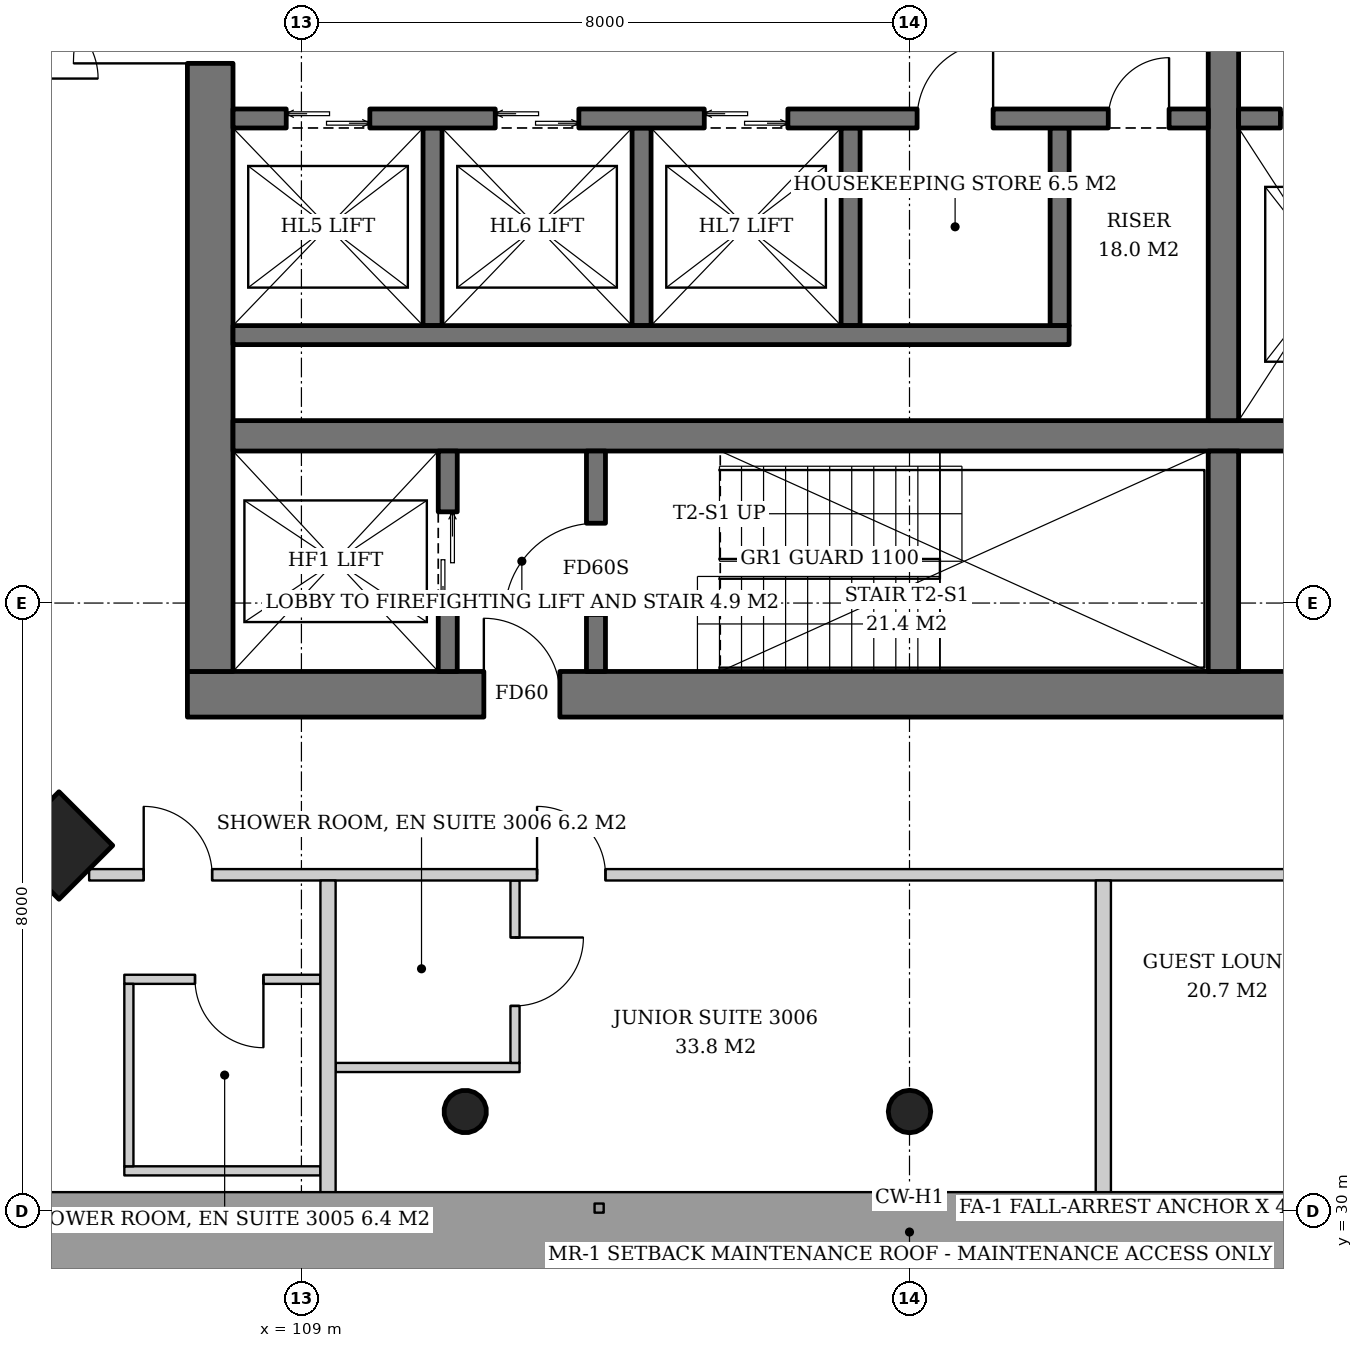
"""IFC4 building model, lengths in metres.
Left out: names, types, materials, properties, quantities, classifications, styles, units other than length and angle.
Written with IfcOpenShell. Run it as: python <this file> out.ifc"""

import sys

from ifc_helpers import new_model, si_unit, direction, frame, frame_2d, origin, origin_2d, place, context, subcontext, project, spatial, rectangle, hollow_circle, extrude, element, fill, save


model = new_model("IFC4")
c1 = context("Model", 3, precision=1e-05, world=origin(), true_north=direction((0.0, 1.0)))
c2 = subcontext(c1, "Body", "Model", "MODEL_VIEW")
j1 = project(units=[si_unit("LENGTHUNIT", "METRE"), si_unit("PLANEANGLEUNIT", "RADIAN")], contexts=[c1])
p1 = place(None, origin())
s1 = spatial("IfcSite", under=j1, at=p1, CompositionType="ELEMENT")
p2 = place(p1, origin())
s2 = spatial("IfcBuilding", under=s1, at=p2, CompositionType="ELEMENT")
p3 = place(p2, frame((0.0, 0.0, 119.8)))
s3 = spatial("IfcBuildingStorey", under=s2, at=p3, CompositionType="ELEMENT", Elevation=119.8)
p4 = place(p3, frame((105.759, 34.759, 0.0), z_axis=(0.043029647111, 0.043029647111, 0.998146732169), x_axis=(-0.707106781187, 0.707106781187, 0.0)))
e1 = element("IfcColumn", 1, at=p4, inside=s3, PredefinedType="COLUMN", context=c2, shape_type="SweptSolid", body=[
    extrude(rectangle(XDim=1.0, YDim=1.0, at=origin_2d()), origin(), (0.0, 0.0, 1.0), 3.807),
])
p5 = place(p3, frame((111.129, 31.259, 0.0), z_axis=(0.021497706284, 0.043059584825, 0.998841188968), x_axis=(-0.894693706707, 0.446680166538, 0.0)))
e2 = element("IfcColumn", 2, at=p5, inside=s3, PredefinedType="COLUMN", context=c2, shape_type="SweptSolid", body=[
    extrude(hollow_circle(Radius=0.28, WallThickness=0.02, at=origin_2d()), origin(), (0.0, 0.0, 1.0), 3.804),
])
p6 = place(p3, frame((117.0, 31.259, 0.0), z_axis=(0.0, 0.043069538298, 0.999072076915), x_axis=(-1.0, 0.0, 0.0)))
e3 = element("IfcColumn", 3, at=p6, inside=s3, PredefinedType="COLUMN", context=c2, shape_type="SweptSolid", body=[
    extrude(hollow_circle(Radius=0.28, WallThickness=0.02, at=origin_2d()), origin(), (0.0, 0.0, 1.0), 3.803),
])
p7 = place(p3, frame((107.5, 36.8, 0.0), z_axis=(0.0, 0.0, 1.0), x_axis=(1.0, 0.0, 0.0)))
e4 = element("IfcWall", 4, at=p7, inside=s3, PredefinedType="SHEAR", context=c2, shape_type="SweptSolid", body=[
    extrude(rectangle(XDim=19.0, YDim=0.6, at=frame_2d((9.5, 0.0))), origin(), (0.0, 0.0, 1.0), 3.8),
])
p8 = place(p7, frame((3.9, 0.0, 0.0)))
e5 = element("IfcOpeningElement", 5, at=p8, cuts=e4, PredefinedType="OPENING", context=c2, shape_type="SweptSolid", body=[
    extrude(rectangle(XDim=1.0, YDim=2.1, at=frame_2d((0.5, 1.05))), frame((0.0, 0.31, 0.0), z_axis=(0.0, -1.0, 0.0), x_axis=(1.0, 0.0, 0.0)), (0.0, 0.0, 1.0), 0.62),
])
p9 = place(p7, frame((14.61, 0.0, 0.0)))
e6 = element("IfcOpeningElement", 6, at=p9, cuts=e4, PredefinedType="OPENING", context=c2, shape_type="SweptSolid", body=[
    extrude(rectangle(XDim=1.0, YDim=2.1, at=frame_2d((0.5, 1.05))), frame((0.0, 0.31, 0.0), z_axis=(0.0, -1.0, 0.0), x_axis=(1.0, 0.0, 0.0)), (0.0, 0.0, 1.0), 0.62),
])
p10 = place(p7, frame((16.639, 0.0, 0.0)))
e7 = element("IfcOpeningElement", 7, at=p10, cuts=e4, PredefinedType="OPENING", context=c2, shape_type="SweptSolid", body=[
    extrude(rectangle(XDim=1.0, YDim=2.1, at=frame_2d((0.5, 1.05))), frame((0.0, 0.31, 0.0), z_axis=(0.0, -1.0, 0.0), x_axis=(1.0, 0.0, 0.0)), (0.0, 0.0, 1.0), 0.62),
])
p11 = place(p3, frame((107.8, 37.1, 0.0), z_axis=(0.0, 0.0, 1.0), x_axis=(0.0, 1.0, 0.0)))
e8 = element("IfcWall", 8, at=p11, inside=s3, PredefinedType="SHEAR", context=c2, shape_type="SweptSolid", body=[
    extrude(rectangle(XDim=17.8, YDim=0.6, at=frame_2d((8.9, 0.0))), origin(), (0.0, 0.0, 1.0), 3.8),
])
p12 = place(p11, frame((8.0, 0.0, 0.0)))
e9 = element("IfcOpeningElement", 9, at=p12, cuts=e8, PredefinedType="OPENING", context=c2, shape_type="SweptSolid", body=[
    extrude(rectangle(XDim=1.8, YDim=2.4, at=frame_2d((0.9, 1.2))), frame((0.0, 0.31, 0.0), z_axis=(0.0, -1.0, 0.0), x_axis=(1.0, 0.0, 0.0)), (0.0, 0.0, 1.0), 0.62),
])
p13 = place(p3, frame((108.1, 40.2, 0.0), z_axis=(0.0, 0.0, 1.0), x_axis=(1.0, 0.0, 0.0)))
e10 = element("IfcWall", 10, at=p13, inside=s3, PredefinedType="SHEAR", context=c2, shape_type="SweptSolid", body=[
    extrude(rectangle(XDim=17.8, YDim=0.4, at=frame_2d((8.9, 0.0))), origin(), (0.0, 0.0, 1.0), 3.8),
])
p14 = place(p3, frame((121.13, 37.1, 0.0), z_axis=(0.0, 0.0, 1.0), x_axis=(0.0, 1.0, 0.0)))
e11 = element("IfcWall", 11, at=p14, inside=s3, PredefinedType="SHEAR", context=c2, shape_type="SweptSolid", body=[
    extrude(rectangle(XDim=2.9, YDim=0.4, at=frame_2d((1.45, 0.0))), origin(), (0.0, 0.0, 1.0), 3.8),
])
p15 = place(p3, frame((121.13, 40.4, 0.0), z_axis=(0.0, 0.0, 1.0), x_axis=(0.0, 1.0, 0.0)))
e12 = element("IfcWall", 12, at=p15, inside=s3, PredefinedType="SHEAR", context=c2, shape_type="SweptSolid", body=[
    extrude(rectangle(XDim=11.2, YDim=0.4, at=frame_2d((5.6, 0.0))), origin(), (0.0, 0.0, 1.0), 3.8),
])
p16 = place(p3, frame((110.925, 37.1, 0.0), z_axis=(0.0, 0.0, 1.0), x_axis=(0.0, 1.0, 0.0)))
e13 = element("IfcWall", 13, at=p16, inside=s3, PredefinedType="SHEAR", context=c2, shape_type="SweptSolid", body=[
    extrude(rectangle(XDim=2.9, YDim=0.25, at=frame_2d((1.45, 0.0))), origin(), (0.0, 0.0, 1.0), 3.8),
])
p17 = place(p16, frame((0.8, 0.0, 0.0)))
e14 = element("IfcOpeningElement", 14, at=p17, cuts=e13, PredefinedType="OPENING", context=c2, shape_type="SweptSolid", body=[
    extrude(rectangle(XDim=1.3, YDim=2.2, at=frame_2d((0.65, 1.1))), frame((0.0, 0.135, 0.0), z_axis=(0.0, -1.0, 0.0), x_axis=(1.0, 0.0, 0.0)), (0.0, 0.0, 1.0), 0.27),
])
p18 = place(p3, frame((112.875, 37.1, 0.0), z_axis=(0.0, 0.0, 1.0), x_axis=(0.0, 1.0, 0.0)))
e15 = element("IfcWall", 15, at=p18, inside=s3, PredefinedType="SHEAR", context=c2, shape_type="SweptSolid", body=[
    extrude(rectangle(XDim=2.9, YDim=0.25, at=frame_2d((1.45, 0.0))), origin(), (0.0, 0.0, 1.0), 3.8),
])
p19 = place(p18, frame((0.75, 0.0, 0.0)))
e16 = element("IfcOpeningElement", 16, at=p19, cuts=e15, PredefinedType="OPENING", context=c2, shape_type="SweptSolid", body=[
    extrude(rectangle(XDim=1.2, YDim=2.1, at=frame_2d((0.6, 1.05))), frame((0.0, 0.135, 0.0), z_axis=(0.0, -1.0, 0.0), x_axis=(1.0, 0.0, 0.0)), (0.0, 0.0, 1.0), 0.27),
])
for number, where, z_axis, x_axis in (
    (17, (110.725, 44.25, 0.0), (0.0, 0.0, 1.0), (0.0, -1.0, 0.0)),
    (18, (113.475, 44.25, 0.0), (0.0, 0.0, 1.0), (0.0, -1.0, 0.0)),
    (19, (116.225, 44.25, 0.0), (0.0, 0.0, 1.0), (0.0, -1.0, 0.0)),
    (20, (118.975, 44.25, 0.0), (0.0, 0.0, 1.0), (0.0, -1.0, 0.0)),
):
    element("IfcWall", number, at=place(p3, frame(where, z_axis=z_axis, x_axis=x_axis)), inside=s3, PredefinedType="SHEAR", context=c2, shape_type="SweptSolid", body=[
        extrude(rectangle(XDim=2.6, YDim=0.25, at=frame_2d((1.3, 0.0))), origin(), (0.0, 0.0, 1.0), 3.8),
    ])
p20 = place(p3, frame((108.1, 41.525, 0.0), z_axis=(0.0, 0.0, 1.0), x_axis=(1.0, 0.0, 0.0)))
e21 = element("IfcWall", 21, at=p20, inside=s3, PredefinedType="SHEAR", context=c2, shape_type="SweptSolid", body=[
    extrude(rectangle(XDim=11.0, YDim=0.25, at=frame_2d((5.5, 0.0))), origin(), (0.0, 0.0, 1.0), 3.8),
])
p21 = place(p3, frame((108.1, 44.375, 0.0), z_axis=(0.0, 0.0, 1.0), x_axis=(1.0, 0.0, 0.0)))
e22 = element("IfcWall", 22, at=p21, inside=s3, PredefinedType="SHEAR", context=c2, shape_type="SweptSolid", body=[
    extrude(rectangle(XDim=12.83, YDim=0.25, at=frame_2d((6.415, 0.0))), origin(), (0.0, 0.0, 1.0), 3.8),
])
p22 = place(p21, frame((0.7, 0.0, 0.0)))
e23 = element("IfcOpeningElement", 23, at=p22, cuts=e22, PredefinedType="OPENING", context=c2, shape_type="SweptSolid", body=[
    extrude(rectangle(XDim=1.1, YDim=2.2, at=frame_2d((0.55, 1.1))), frame((0.0, 0.135, 0.0), z_axis=(0.0, -1.0, 0.0), x_axis=(1.0, 0.0, 0.0)), (0.0, 0.0, 1.0), 0.27),
])
p23 = place(p21, frame((3.45, 0.0, 0.0)))
e24 = element("IfcOpeningElement", 24, at=p23, cuts=e22, PredefinedType="OPENING", context=c2, shape_type="SweptSolid", body=[
    extrude(rectangle(XDim=1.1, YDim=2.2, at=frame_2d((0.55, 1.1))), frame((0.0, 0.135, 0.0), z_axis=(0.0, -1.0, 0.0), x_axis=(1.0, 0.0, 0.0)), (0.0, 0.0, 1.0), 0.27),
])
p24 = place(p21, frame((6.2, 0.0, 0.0)))
e25 = element("IfcOpeningElement", 25, at=p24, cuts=e22, PredefinedType="OPENING", context=c2, shape_type="SweptSolid", body=[
    extrude(rectangle(XDim=1.1, YDim=2.2, at=frame_2d((0.55, 1.1))), frame((0.0, 0.135, 0.0), z_axis=(0.0, -1.0, 0.0), x_axis=(1.0, 0.0, 0.0)), (0.0, 0.0, 1.0), 0.27),
])
p25 = place(p21, frame((9.0, 0.0, 0.0)))
e26 = element("IfcOpeningElement", 26, at=p25, cuts=e22, PredefinedType="OPENING", context=c2, shape_type="SweptSolid", body=[
    extrude(rectangle(XDim=1.0, YDim=2.1, at=frame_2d((0.5, 1.05))), frame((0.0, 0.135, 0.0), z_axis=(0.0, -1.0, 0.0), x_axis=(1.0, 0.0, 0.0)), (0.0, 0.0, 1.0), 0.27),
])
p26 = place(p21, frame((11.515, 0.0, 0.0)))
e27 = element("IfcOpeningElement", 27, at=p26, cuts=e22, PredefinedType="OPENING", context=c2, shape_type="SweptSolid", body=[
    extrude(rectangle(XDim=0.8, YDim=2.0, at=frame_2d((0.4, 1.0))), frame((0.0, 0.135, 0.0), z_axis=(0.0, -1.0, 0.0), x_axis=(1.0, 0.0, 0.0)), (0.0, 0.0, 1.0), 0.27),
])
p27 = place(p3, frame((121.33, 44.375, 0.0), z_axis=(0.0, 0.0, 1.0), x_axis=(1.0, 0.0, 0.0)))
e28 = element("IfcWall", 28, at=p27, inside=s3, PredefinedType="SHEAR", context=c2, shape_type="SweptSolid", body=[
    extrude(rectangle(XDim=4.57, YDim=0.25, at=frame_2d((2.285, 0.0))), origin(), (0.0, 0.0, 1.0), 3.8),
])
p28 = place(p27, frame((0.55, 0.0, 0.0)))
e29 = element("IfcOpeningElement", 29, at=p28, cuts=e28, PredefinedType="OPENING", context=c2, shape_type="SweptSolid", body=[
    extrude(rectangle(XDim=1.4, YDim=2.4, at=frame_2d((0.7, 1.2))), frame((0.0, 0.135, 0.0), z_axis=(0.0, -1.0, 0.0), x_axis=(1.0, 0.0, 0.0)), (0.0, 0.0, 1.0), 0.27),
])
p29 = place(p27, frame((3.26, 0.0, 0.0)))
e30 = element("IfcOpeningElement", 30, at=p29, cuts=e28, PredefinedType="OPENING", context=c2, shape_type="SweptSolid", body=[
    extrude(rectangle(XDim=0.8, YDim=2.0, at=frame_2d((0.4, 1.0))), frame((0.0, 0.135, 0.0), z_axis=(0.0, -1.0, 0.0), x_axis=(1.0, 0.0, 0.0)), (0.0, 0.0, 1.0), 0.27),
])
p30 = place(p3, frame((109.25, 33.05, 0.0), z_axis=(0.0, 0.0, 1.0), x_axis=(-1.0, 0.0, 0.0)))
e31 = element("IfcWall", 31, at=p30, inside=s3, PredefinedType="PARTITIONING", context=c2, shape_type="SweptSolid", body=[
    extrude(rectangle(XDim=2.58, YDim=0.12, at=frame_2d((1.29, 0.0))), origin(), (0.0, 0.0, 1.0), 2.9),
])
p31 = place(p30, frame((0.75, 0.0, 0.0)))
e32 = element("IfcOpeningElement", 32, at=p31, cuts=e31, PredefinedType="OPENING", context=c2, shape_type="SweptSolid", body=[
    extrude(rectangle(XDim=0.9, YDim=2.1, at=frame_2d((0.45, 1.05))), frame((0.0, 0.07, 0.0), z_axis=(0.0, -1.0, 0.0), x_axis=(1.0, 0.0, 0.0)), (0.0, 0.0, 1.0), 0.14),
])
p32 = place(p3, frame((109.25, 30.53, 0.0), z_axis=(0.0, 0.0, 1.0), x_axis=(-1.0, 0.0, 0.0)))
e33 = element("IfcWall", 33, at=p32, inside=s3, PredefinedType="PARTITIONING", context=c2, shape_type="SweptSolid", body=[
    extrude(rectangle(XDim=2.58, YDim=0.12, at=frame_2d((1.29, 0.0))), origin(), (0.0, 0.0, 1.0), 3.6),
])
p33 = place(p3, frame((106.73, 32.99, 0.0), z_axis=(0.0, 0.0, 1.0), x_axis=(0.0, -1.0, 0.0)))
e34 = element("IfcWall", 34, at=p33, inside=s3, PredefinedType="PARTITIONING", context=c2, shape_type="SweptSolid", body=[
    extrude(rectangle(XDim=2.4, YDim=0.12, at=frame_2d((1.2, 0.0))), origin(), (0.0, 0.0, 1.0), 3.2),
])
p34 = place(p3, frame((109.45, 31.89, 0.0), z_axis=(0.0, 0.0, 1.0), x_axis=(1.0, 0.0, 0.0)))
e35 = element("IfcWall", 35, at=p34, inside=s3, PredefinedType="PARTITIONING", context=c2, shape_type="SweptSolid", body=[
    extrude(rectangle(XDim=2.42, YDim=0.12, at=frame_2d((1.21, 0.0))), origin(), (0.0, 0.0, 1.0), 3.0),
])
p35 = place(p3, frame((111.81, 34.35, 0.0), z_axis=(0.0, 0.0, 1.0), x_axis=(0.0, -1.0, 0.0)))
e36 = element("IfcWall", 36, at=p35, inside=s3, PredefinedType="PARTITIONING", context=c2, shape_type="SweptSolid", body=[
    extrude(rectangle(XDim=2.4, YDim=0.12, at=frame_2d((1.2, 0.0))), origin(), (0.0, 0.0, 1.0), 3.0),
])
p36 = place(p35, frame((0.75, 0.0, 0.0)))
e37 = element("IfcOpeningElement", 37, at=p36, cuts=e36, PredefinedType="OPENING", context=c2, shape_type="SweptSolid", body=[
    extrude(rectangle(XDim=0.9, YDim=2.1, at=frame_2d((0.45, 1.05))), frame((0.0, 0.07, 0.0), z_axis=(0.0, -1.0, 0.0), x_axis=(1.0, 0.0, 0.0)), (0.0, 0.0, 1.0), 0.14),
])
p37 = place(p3, frame((106.207, 34.425, 0.0), z_axis=(0.0, 0.0, 1.0), x_axis=(1.0, 0.0, 0.0)))
e38 = element("IfcWall", 38, at=p37, inside=s3, PredefinedType="PARTITIONING", context=c2, shape_type="SweptSolid", body=[
    extrude(rectangle(XDim=21.586, YDim=0.15, at=frame_2d((10.793, 0.0))), origin(), (0.0, 0.0, 1.0), 2.9),
])
p38 = place(p37, frame((0.718, 0.0, 0.0)))
e39 = element("IfcOpeningElement", 39, at=p38, cuts=e38, PredefinedType="OPENING", context=c2, shape_type="SweptSolid", body=[
    extrude(rectangle(XDim=0.9, YDim=2.1, at=frame_2d((0.45, 1.05))), frame((0.0, 0.085, 0.0), z_axis=(0.0, -1.0, 0.0), x_axis=(1.0, 0.0, 0.0)), (0.0, 0.0, 1.0), 0.17),
])
p39 = place(p37, frame((5.893, 0.0, 0.0)))
e40 = element("IfcOpeningElement", 40, at=p39, cuts=e38, PredefinedType="OPENING", context=c2, shape_type="SweptSolid", body=[
    extrude(rectangle(XDim=0.9, YDim=2.1, at=frame_2d((0.45, 1.05))), frame((0.0, 0.085, 0.0), z_axis=(0.0, -1.0, 0.0), x_axis=(1.0, 0.0, 0.0)), (0.0, 0.0, 1.0), 0.17),
])
p40 = place(p37, frame((16.043, 0.0, 0.0)))
e41 = element("IfcOpeningElement", 41, at=p40, cuts=e38, PredefinedType="OPENING", context=c2, shape_type="SweptSolid", body=[
    extrude(rectangle(XDim=1.0, YDim=2.1, at=frame_2d((0.5, 1.05))), frame((0.0, 0.085, 0.0), z_axis=(0.0, -1.0, 0.0), x_axis=(1.0, 0.0, 0.0)), (0.0, 0.0, 1.0), 0.17),
])
p41 = place(p3, frame((109.35, 34.35, 0.0), z_axis=(0.0, 0.0, 1.0), x_axis=(0.0, -1.0, 0.0)))
e42 = element("IfcWall", 42, at=p41, inside=s3, PredefinedType="PARTITIONING", context=c2, shape_type="SweptSolid", body=[
    extrude(rectangle(XDim=4.14, YDim=0.2, at=frame_2d((2.07, 0.0))), origin(), (0.0, 0.0, 1.0), 3.2),
])
p42 = place(p3, frame((119.55, 34.35, 0.0), z_axis=(0.0, 0.0, 1.0), x_axis=(0.0, -1.0, 0.0)))
e43 = element("IfcWall", 43, at=p42, inside=s3, PredefinedType="PARTITIONING", context=c2, shape_type="SweptSolid", body=[
    extrude(rectangle(XDim=4.14, YDim=0.2, at=frame_2d((2.07, 0.0))), origin(), (0.0, 0.0, 1.0), 3.0),
])
p43 = place(p17, origin())
e44 = element("IfcDoor", 44, at=p43, inside=s3, OperationType="DOUBLE_DOOR_SLIDING", PredefinedType="DOOR", context=c2, shape_type="SweptSolid", body=[
    extrude(rectangle(XDim=1.3, YDim=2.2, at=frame_2d((0.65, 1.1))), frame((0.0, 0.025, 0.0), z_axis=(0.0, -1.0, 0.0), x_axis=(1.0, 0.0, 0.0)), (0.0, 0.0, 1.0), 0.05),
])
fill(e14, e44)
p44 = place(p19, origin())
e45 = element("IfcDoor", 45, at=p44, inside=s3, OperationType="SINGLE_SWING_LEFT", PredefinedType="DOOR", context=c2, shape_type="SweptSolid", body=[
    extrude(rectangle(XDim=1.2, YDim=2.1, at=frame_2d((0.6, 1.05))), frame((0.0, 0.025, 0.0), z_axis=(0.0, -1.0, 0.0), x_axis=(1.0, 0.0, 0.0)), (0.0, 0.0, 1.0), 0.05),
])
fill(e16, e45)
p45 = place(p22, origin())
e46 = element("IfcDoor", 46, at=p45, inside=s3, OperationType="DOUBLE_DOOR_SLIDING", PredefinedType="DOOR", context=c2, shape_type="SweptSolid", body=[
    extrude(rectangle(XDim=1.1, YDim=2.2, at=frame_2d((0.55, 1.1))), frame((0.0, 0.025, 0.0), z_axis=(0.0, -1.0, 0.0), x_axis=(1.0, 0.0, 0.0)), (0.0, 0.0, 1.0), 0.05),
])
fill(e23, e46)
p46 = place(p23, origin())
e47 = element("IfcDoor", 47, at=p46, inside=s3, OperationType="DOUBLE_DOOR_SLIDING", PredefinedType="DOOR", context=c2, shape_type="SweptSolid", body=[
    extrude(rectangle(XDim=1.1, YDim=2.2, at=frame_2d((0.55, 1.1))), frame((0.0, 0.025, 0.0), z_axis=(0.0, -1.0, 0.0), x_axis=(1.0, 0.0, 0.0)), (0.0, 0.0, 1.0), 0.05),
])
fill(e24, e47)
p47 = place(p24, origin())
e48 = element("IfcDoor", 48, at=p47, inside=s3, OperationType="DOUBLE_DOOR_SLIDING", PredefinedType="DOOR", context=c2, shape_type="SweptSolid", body=[
    extrude(rectangle(XDim=1.1, YDim=2.2, at=frame_2d((0.55, 1.1))), frame((0.0, 0.025, 0.0), z_axis=(0.0, -1.0, 0.0), x_axis=(1.0, 0.0, 0.0)), (0.0, 0.0, 1.0), 0.05),
])
fill(e25, e48)
p48 = place(p25, origin())
e49 = element("IfcDoor", 49, at=p48, inside=s3, OperationType="SINGLE_SWING_RIGHT", PredefinedType="DOOR", context=c2, shape_type="SweptSolid", body=[
    extrude(rectangle(XDim=1.0, YDim=2.1, at=frame_2d((0.5, 1.05))), frame((0.0, 0.025, 0.0), z_axis=(0.0, -1.0, 0.0), x_axis=(1.0, 0.0, 0.0)), (0.0, 0.0, 1.0), 0.05),
])
fill(e26, e49)
p49 = place(p26, origin())
e50 = element("IfcDoor", 50, at=p49, inside=s3, OperationType="SINGLE_SWING_RIGHT", PredefinedType="DOOR", context=c2, shape_type="SweptSolid", body=[
    extrude(rectangle(XDim=0.8, YDim=2.0, at=frame_2d((0.4, 1.0))), frame((0.0, 0.025, 0.0), z_axis=(0.0, -1.0, 0.0), x_axis=(1.0, 0.0, 0.0)), (0.0, 0.0, 1.0), 0.05),
])
fill(e27, e50)
p50 = place(p28, origin())
e51 = element("IfcDoor", 51, at=p50, inside=s3, OperationType="DOUBLE_DOOR_SLIDING", PredefinedType="DOOR", context=c2, shape_type="SweptSolid", body=[
    extrude(rectangle(XDim=1.4, YDim=2.4, at=frame_2d((0.7, 1.2))), frame((0.0, 0.025, 0.0), z_axis=(0.0, -1.0, 0.0), x_axis=(1.0, 0.0, 0.0)), (0.0, 0.0, 1.0), 0.05),
])
fill(e29, e51)
p51 = place(p8, origin())
e52 = element("IfcDoor", 52, at=p51, inside=s3, OperationType="SINGLE_SWING_LEFT", PredefinedType="DOOR", context=c2, shape_type="SweptSolid", body=[
    extrude(rectangle(XDim=1.0, YDim=2.1, at=frame_2d((0.5, 1.05))), frame((0.0, 0.025, 0.0), z_axis=(0.0, -1.0, 0.0), x_axis=(1.0, 0.0, 0.0)), (0.0, 0.0, 1.0), 0.05),
])
fill(e5, e52)
p52 = place(p12, origin())
e53 = element("IfcDoor", 53, at=p52, inside=s3, OperationType="DOUBLE_DOOR_SINGLE_SWING", PredefinedType="DOOR", context=c2, shape_type="SweptSolid", body=[
    extrude(rectangle(XDim=1.8, YDim=2.4, at=frame_2d((0.9, 1.2))), frame((0.0, 0.025, 0.0), z_axis=(0.0, -1.0, 0.0), x_axis=(1.0, 0.0, 0.0)), (0.0, 0.0, 1.0), 0.05),
])
fill(e9, e53)
p53 = place(p31, origin())
e54 = element("IfcDoor", 54, at=p53, inside=s3, OperationType="SINGLE_SWING_LEFT", PredefinedType="DOOR", context=c2, shape_type="SweptSolid", body=[
    extrude(rectangle(XDim=0.9, YDim=2.1, at=frame_2d((0.45, 1.05))), frame((0.0, 0.025, 0.0), z_axis=(0.0, -1.0, 0.0), x_axis=(1.0, 0.0, 0.0)), (0.0, 0.0, 1.0), 0.05),
])
fill(e32, e54)
p54 = place(p36, origin())
e55 = element("IfcDoor", 55, at=p54, inside=s3, OperationType="SINGLE_SWING_LEFT", PredefinedType="DOOR", context=c2, shape_type="SweptSolid", body=[
    extrude(rectangle(XDim=0.9, YDim=2.1, at=frame_2d((0.45, 1.05))), frame((0.0, 0.025, 0.0), z_axis=(0.0, -1.0, 0.0), x_axis=(1.0, 0.0, 0.0)), (0.0, 0.0, 1.0), 0.05),
])
fill(e37, e55)
p55 = place(p38, origin())
e56 = element("IfcDoor", 56, at=p55, inside=s3, OperationType="SINGLE_SWING_LEFT", PredefinedType="DOOR", context=c2, shape_type="SweptSolid", body=[
    extrude(rectangle(XDim=0.9, YDim=2.1, at=frame_2d((0.45, 1.05))), frame((0.0, 0.025, 0.0), z_axis=(0.0, -1.0, 0.0), x_axis=(1.0, 0.0, 0.0)), (0.0, 0.0, 1.0), 0.05),
])
fill(e39, e56)
p56 = place(p39, origin())
e57 = element("IfcDoor", 57, at=p56, inside=s3, OperationType="SINGLE_SWING_LEFT", PredefinedType="DOOR", context=c2, shape_type="SweptSolid", body=[
    extrude(rectangle(XDim=0.9, YDim=2.1, at=frame_2d((0.45, 1.05))), frame((0.0, 0.025, 0.0), z_axis=(0.0, -1.0, 0.0), x_axis=(1.0, 0.0, 0.0)), (0.0, 0.0, 1.0), 0.05),
])
fill(e40, e57)
save(model, sys.argv[1])
